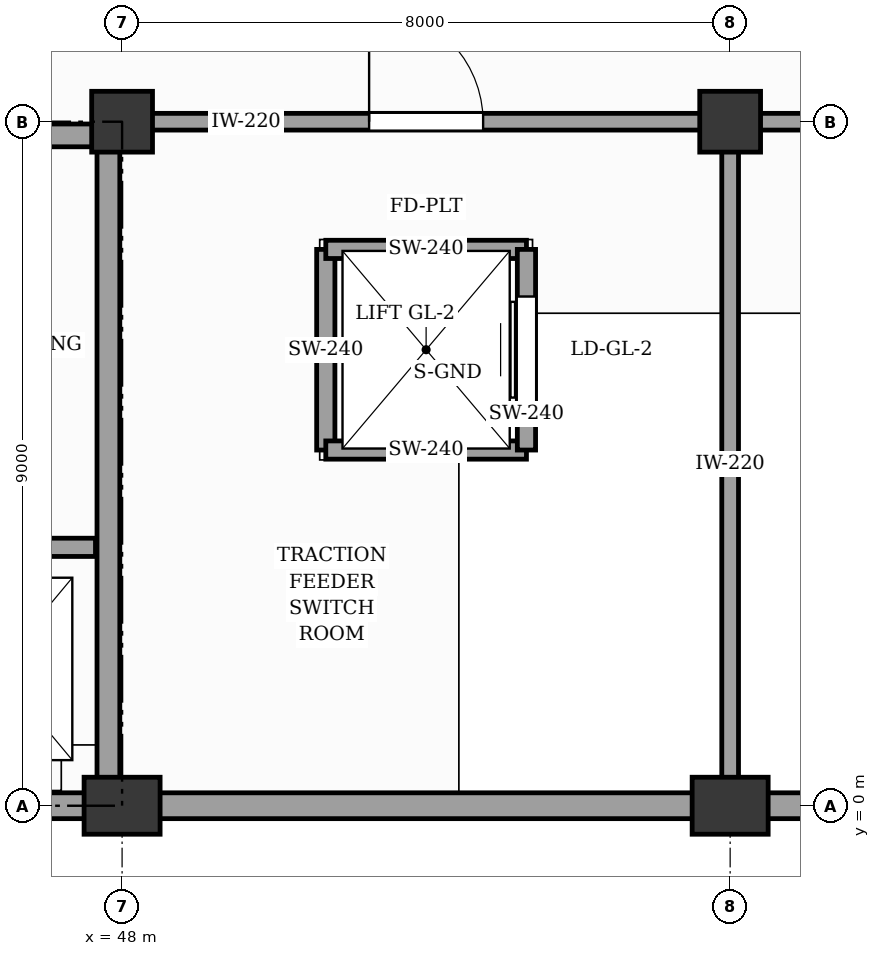
"""IFC4 building model, lengths in metres.
Left out: names, types, materials, properties, quantities, classifications, styles, units other than length and angle.
Written with IfcOpenShell. Run it as: python <this file> out.ifc"""

import sys

from ifc_helpers import new_model, si_unit, direction, frame, frame_2d, origin, origin_2d, place, context, subcontext, project, spatial, rectangle, extrude, element, fill, save


model = new_model("IFC4")
c1 = context("Model", 3, precision=1e-05, world=origin(), true_north=direction((0.0, 1.0)))
c2 = subcontext(c1, "Body", "Model", "MODEL_VIEW")
j1 = project(units=[si_unit("LENGTHUNIT", "METRE"), si_unit("PLANEANGLEUNIT", "RADIAN")], contexts=[c1])
p1 = place(None, origin())
s1 = spatial("IfcSite", under=j1, at=p1, CompositionType="ELEMENT")
p2 = place(p1, origin())
s2 = spatial("IfcBuilding", under=s1, at=p2, CompositionType="ELEMENT")
p3 = place(p2, origin())
s3 = spatial("IfcBuildingStorey", under=s2, at=p3, CompositionType="ELEMENT", Elevation=0.0)
p4 = place(p3, frame((48.0, 0.0, -0.3), z_axis=(0.0, 0.0, 1.0), x_axis=(1.0, 0.0, 0.0)))
e1 = element("IfcColumn", 1, at=p4, inside=s3, PredefinedType="PILASTER", context=c2, shape_type="SweptSolid", body=[
    extrude(rectangle(XDim=1.0, YDim=0.75, at=origin_2d()), origin(), (0.0, 0.0, 1.0), 5.1),
])
p5 = place(p3, frame((48.0, 9.0, -0.3), z_axis=(0.0, 0.0, 1.0), x_axis=(1.0, 0.0, 0.0)))
e2 = element("IfcColumn", 2, at=p5, inside=s3, PredefinedType="COLUMN", context=c2, shape_type="SweptSolid", body=[
    extrude(rectangle(XDim=0.8, YDim=0.8, at=origin_2d()), origin(), (0.0, 0.0, 1.0), 5.1),
])
p6 = place(p3, frame((56.0, 0.0, -0.3), z_axis=(0.0, 0.0, 1.0), x_axis=(1.0, 0.0, 0.0)))
e3 = element("IfcColumn", 3, at=p6, inside=s3, PredefinedType="PILASTER", context=c2, shape_type="SweptSolid", body=[
    extrude(rectangle(XDim=1.0, YDim=0.75, at=origin_2d()), origin(), (0.0, 0.0, 1.0), 5.1),
])
p7 = place(p3, frame((56.0, 9.0, -0.3), z_axis=(0.0, 0.0, 1.0), x_axis=(1.0, 0.0, 0.0)))
e4 = element("IfcColumn", 4, at=p7, inside=s3, PredefinedType="COLUMN", context=c2, shape_type="SweptSolid", body=[
    extrude(rectangle(XDim=0.8, YDim=0.8, at=origin_2d()), origin(), (0.0, 0.0, 1.0), 5.1),
])
for number, where, z_axis, x_axis in (
    (5, (40.4, 0.0, 0.0), (0.0, 0.0, 1.0), (1.0, 0.0, 0.0)),
    (6, (48.4, 0.0, 0.0), (0.0, 0.0, 1.0), (1.0, 0.0, 0.0)),
):
    element("IfcWall", number, at=place(p3, frame(where, z_axis=z_axis, x_axis=x_axis)), inside=s3, PredefinedType="SOLIDWALL", context=c2, shape_type="SweptSolid", body=[
        extrude(rectangle(XDim=7.2, YDim=0.34, at=frame_2d((3.6, 0.0))), origin(), (0.0, 0.0, 1.0), 3.81),
    ])
p8 = place(p3, frame((56.4, 0.0, 0.0), z_axis=(0.0, 0.0, 1.0), x_axis=(1.0, 0.0, 0.0)))
e7 = element("IfcWall", 7, at=p8, inside=s3, PredefinedType="SOLIDWALL", context=c2, shape_type="SweptSolid", body=[
    extrude(rectangle(XDim=7.2, YDim=0.34, at=frame_2d((3.6, 0.0))), origin(), (0.0, 0.0, 1.0), 3.03),
])
p9 = place(p3, frame((45.02, 3.4, 0.0), z_axis=(0.0, 0.0, 1.0), x_axis=(1.0, 0.0, 0.0)))
e8 = element("IfcWall", 8, at=p9, inside=s3, PredefinedType="SHEAR", context=c2, shape_type="SweptSolid", body=[
    extrude(rectangle(XDim=2.63, YDim=0.24, at=frame_2d((1.315, 0.0))), origin(), (0.0, 0.0, 1.0), 4.52),
])
p10 = place(p9, frame((0.715, 0.0, 0.0)))
e9 = element("IfcOpeningElement", 9, at=p10, cuts=e8, PredefinedType="OPENING", context=c2, shape_type="SweptSolid", body=[
    extrude(rectangle(XDim=1.2, YDim=2.15, at=frame_2d((0.6, 1.075))), frame((0.0, 0.13, 0.0), z_axis=(0.0, -1.0, 0.0), x_axis=(1.0, 0.0, 0.0)), (0.0, 0.0, 1.0), 0.26),
])
p11 = place(p3, frame((47.82, 0.18, 0.0), z_axis=(0.0, 0.0, 1.0), x_axis=(0.0, 1.0, 0.0)))
e10 = element("IfcWall", 10, at=p11, inside=s3, PredefinedType="SHEAR", context=c2, shape_type="SweptSolid", body=[
    extrude(rectangle(XDim=8.64, YDim=0.3, at=frame_2d((4.32, 0.0))), origin(), (0.0, 0.0, 1.0), 4.52),
])
p12 = place(p3, frame((40.03, 8.82, 0.0), z_axis=(0.0, 0.0, 1.0), x_axis=(1.0, 0.0, 0.0)))
e11 = element("IfcWall", 11, at=p12, inside=s3, PredefinedType="SHEAR", context=c2, shape_type="SweptSolid", body=[
    extrude(rectangle(XDim=7.94, YDim=0.3, at=frame_2d((3.97, 0.0))), origin(), (0.0, 0.0, 1.0), 4.52),
])
p13 = place(p12, frame((5.35, 0.0, 0.0)))
e12 = element("IfcOpeningElement", 12, at=p13, cuts=e11, PredefinedType="OPENING", context=c2, shape_type="SweptSolid", body=[
    extrude(rectangle(XDim=1.6, YDim=2.15, at=frame_2d((0.8, 1.075))), frame((0.0, 0.16, 0.0), z_axis=(0.0, -1.0, 0.0), x_axis=(1.0, 0.0, 0.0)), (0.0, 0.0, 1.0), 0.32),
])
p14 = place(p12, frame((0.9, 0.0, 0.0)))
e13 = element("IfcOpeningElement", 13, at=p14, cuts=e11, PredefinedType="OPENING", context=c2, shape_type="SweptSolid", body=[
    extrude(rectangle(XDim=1.8, YDim=2.2, at=frame_2d((0.9, 1.1))), frame((0.0, 0.16, 0.0), z_axis=(0.0, -1.0, 0.0), x_axis=(1.0, 0.0, 0.0)), (0.0, 0.0, 1.0), 0.32),
])
for number, where, z_axis, x_axis in (
    (14, (50.68, 4.68, 0.0), (0.0, 0.0, 1.0), (0.0, 1.0, 0.0)),
    (15, (50.68, 4.68, 0.0), (0.0, 0.0, 1.0), (1.0, 0.0, 0.0)),
    (16, (50.68, 7.32, 0.0), (0.0, 0.0, 1.0), (1.0, 0.0, 0.0)),
):
    element("IfcWall", number, at=place(p3, frame(where, z_axis=z_axis, x_axis=x_axis)), inside=s3, PredefinedType="SHEAR", context=c2, shape_type="SweptSolid", body=[
        extrude(rectangle(XDim=2.64, YDim=0.24, at=frame_2d((1.32, 0.0))), origin(), (0.0, 0.0, 1.0), 4.55),
    ])
p15 = place(p3, frame((53.32, 4.68, 0.0), z_axis=(0.0, 0.0, 1.0), x_axis=(0.0, 1.0, 0.0)))
e17 = element("IfcWall", 17, at=p15, inside=s3, PredefinedType="SHEAR", context=c2, shape_type="SweptSolid", body=[
    extrude(rectangle(XDim=2.64, YDim=0.24, at=frame_2d((1.32, 0.0))), origin(), (0.0, 0.0, 1.0), 4.55),
])
p16 = place(p15, frame((0.62, 0.0, 0.0)))
e18 = element("IfcOpeningElement", 18, at=p16, cuts=e17, PredefinedType="OPENING", context=c2, shape_type="SweptSolid", body=[
    extrude(rectangle(XDim=1.4, YDim=2.15, at=frame_2d((0.7, 1.075))), frame((0.0, 0.13, 0.0), z_axis=(0.0, -1.0, 0.0), x_axis=(1.0, 0.0, 0.0)), (0.0, 0.0, 1.0), 0.26),
])
p17 = place(p3, frame((48.3, 9.0, 0.0), z_axis=(0.0, 0.0, 1.0), x_axis=(1.0, 0.0, 0.0)))
e19 = element("IfcWall", 19, at=p17, inside=s3, PredefinedType="SOLIDWALL", context=c2, shape_type="SweptSolid", body=[
    extrude(rectangle(XDim=7.4, YDim=0.22, at=frame_2d((3.7, 0.0))), origin(), (0.0, 0.0, 1.0), 3.56),
])
p18 = place(p17, frame((2.95, 0.0, 0.0)))
e20 = element("IfcOpeningElement", 20, at=p18, cuts=e19, PredefinedType="OPENING", context=c2, shape_type="SweptSolid", body=[
    extrude(rectangle(XDim=1.5, YDim=2.2, at=frame_2d((0.75, 1.1))), frame((0.0, 0.12, 0.0), z_axis=(0.0, -1.0, 0.0), x_axis=(1.0, 0.0, 0.0)), (0.0, 0.0, 1.0), 0.24),
])
p19 = place(p3, frame((56.0, 0.3, 0.0), z_axis=(0.0, 0.0, 1.0), x_axis=(0.0, 1.0, 0.0)))
e21 = element("IfcWall", 21, at=p19, inside=s3, PredefinedType="SOLIDWALL", context=c2, shape_type="SweptSolid", body=[
    extrude(rectangle(XDim=8.4, YDim=0.22, at=frame_2d((4.2, 0.0))), origin(), (0.0, 0.0, 1.0), 3.56),
])
p20 = place(p3, frame((56.3, 9.0, 0.0), z_axis=(0.0, 0.0, 1.0), x_axis=(1.0, 0.0, 0.0)))
e22 = element("IfcWall", 22, at=p20, inside=s3, PredefinedType="SOLIDWALL", context=c2, shape_type="SweptSolid", body=[
    extrude(rectangle(XDim=7.4, YDim=0.22, at=frame_2d((3.7, 0.0))), origin(), (0.0, 0.0, 1.0), 2.73),
])
p21 = place(p20, frame((2.95, 0.0, 0.0)))
e23 = element("IfcOpeningElement", 23, at=p21, cuts=e22, PredefinedType="OPENING", context=c2, shape_type="SweptSolid", body=[
    extrude(rectangle(XDim=1.5, YDim=2.2, at=frame_2d((0.75, 1.1))), frame((0.0, 0.12, 0.0), z_axis=(0.0, -1.0, 0.0), x_axis=(1.0, 0.0, 0.0)), (0.0, 0.0, 1.0), 0.24),
])
p22 = place(p16, origin())
e24 = element("IfcDoor", 24, at=p22, inside=s3, OperationType="DOUBLE_DOOR_SLIDING", PredefinedType="DOOR", context=c2, shape_type="SweptSolid", body=[
    extrude(rectangle(XDim=1.4, YDim=2.15, at=frame_2d((0.7, 1.075))), frame((0.0, 0.025, 0.0), z_axis=(0.0, -1.0, 0.0), x_axis=(1.0, 0.0, 0.0)), (0.0, 0.0, 1.0), 0.05),
])
fill(e18, e24)
p23 = place(p18, origin())
e25 = element("IfcDoor", 25, at=p23, inside=s3, OperationType="SINGLE_SWING_LEFT", PredefinedType="DOOR", context=c2, shape_type="SweptSolid", body=[
    extrude(rectangle(XDim=1.5, YDim=2.2, at=frame_2d((0.75, 1.1))), frame((0.0, 0.025, 0.0), z_axis=(0.0, -1.0, 0.0), x_axis=(1.0, 0.0, 0.0)), (0.0, 0.0, 1.0), 0.05),
])
fill(e20, e25)
save(model, sys.argv[1])
